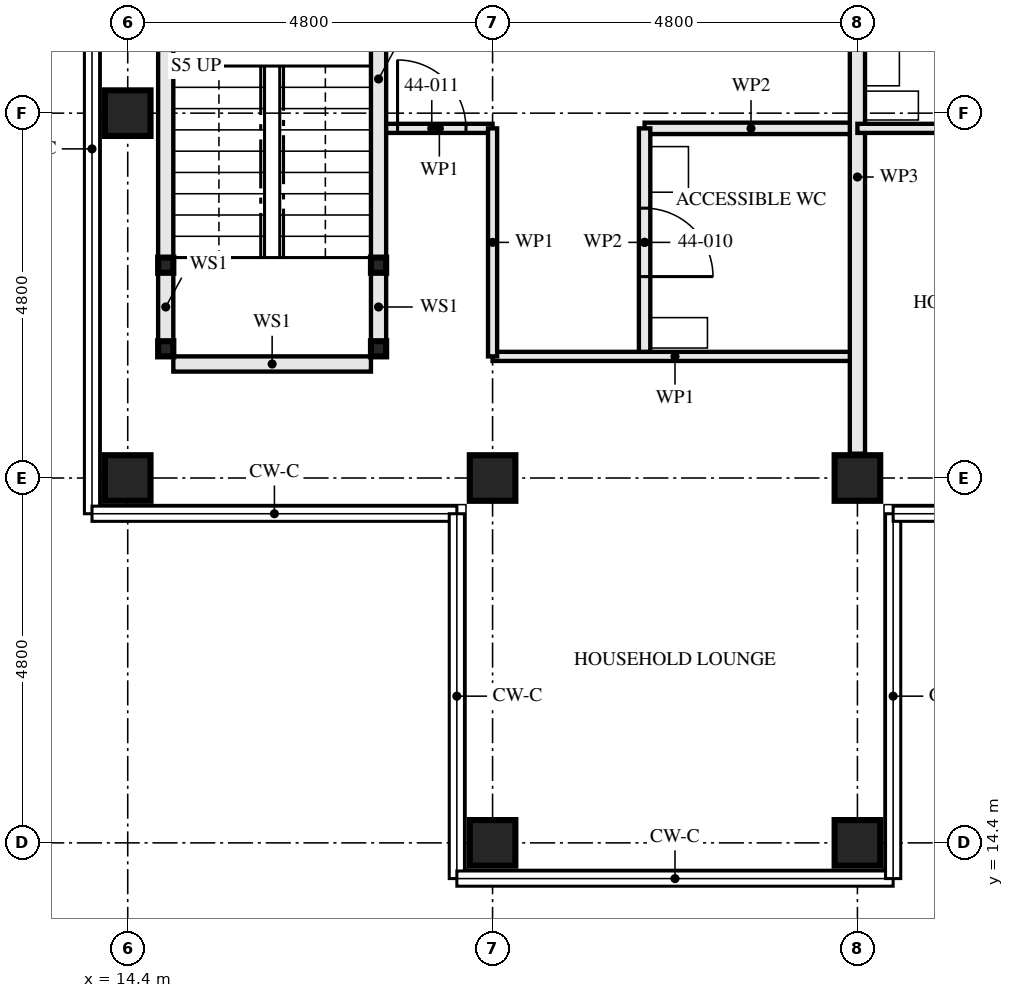
"""IFC4 building model, lengths in metres.
Left out: names, types, materials, properties, quantities, classifications, styles, units other than length and angle.
Written with IfcOpenShell. Run it as: python <this file> out.ifc"""

import sys

from ifc_helpers import new_model, si_unit, direction, frame, frame_2d, origin, origin_2d, place, context, subcontext, project, spatial, rectangle, hollow_rectangle, extrude, element, fill, save


model = new_model("IFC4")
c1 = context("Model", 3, precision=1e-05, world=origin(), true_north=direction((0.0, 1.0)))
c2 = subcontext(c1, "Body", "Model", "MODEL_VIEW")
j1 = project(units=[si_unit("LENGTHUNIT", "METRE"), si_unit("PLANEANGLEUNIT", "RADIAN")], contexts=[c1])
p1 = place(None, origin())
s1 = spatial("IfcSite", under=j1, at=p1, CompositionType="ELEMENT")
p2 = place(p1, origin())
s2 = spatial("IfcBuilding", under=s1, at=p2, CompositionType="ELEMENT")
p3 = place(p2, frame((0.0, 0.0, 162.0)))
s3 = spatial("IfcBuildingStorey", under=s2, at=p3, CompositionType="ELEMENT", Elevation=162.0)
p4 = place(p3, frame((14.4, 19.2, 0.0), z_axis=(0.0, 0.0, 1.0), x_axis=(0.0, 1.0, 0.0)))
e1 = element("IfcColumn", 1, at=p4, inside=s3, PredefinedType="COLUMN", context=c2, shape_type="SweptSolid", body=[
    extrude(hollow_rectangle(XDim=0.6, YDim=0.6, WallThickness=0.06, at=origin_2d()), origin(), (0.0, 0.0, 1.0), 3.5),
])
p5 = place(p3, frame((14.4, 24.0, 0.0), z_axis=(0.0, 0.0, 1.0), x_axis=(1.0, 0.0, 0.0)))
e2 = element("IfcColumn", 2, at=p5, inside=s3, PredefinedType="COLUMN", context=c2, shape_type="SweptSolid", body=[
    extrude(hollow_rectangle(XDim=0.6, YDim=0.6, WallThickness=0.08, at=origin_2d()), origin(), (0.0, 0.0, 1.0), 3.5),
])
for number, where, z_axis, x_axis in (
    (3, (19.2, 14.4, 0.0), (0.0, 0.0, 1.0), (0.0, 1.0, 0.0)),
    (4, (19.2, 19.2, 0.0), (0.0, 0.0, 1.0), (0.0, 1.0, 0.0)),
    (5, (24.0, 14.4, 0.0), (0.0, 0.0, 1.0), (0.0, 1.0, 0.0)),
    (6, (24.0, 19.2, 0.0), (0.0, 0.0, 1.0), (0.0, 1.0, 0.0)),
):
    element("IfcColumn", number, at=place(p3, frame(where, z_axis=z_axis, x_axis=x_axis)), inside=s3, PredefinedType="COLUMN", context=c2, shape_type="SweptSolid", body=[
        extrude(hollow_rectangle(XDim=0.6, YDim=0.6, WallThickness=0.06, at=origin_2d()), origin(), (0.0, 0.0, 1.0), 3.5),
    ])
for number, where, z_axis, x_axis in (
    (7, (14.9, 20.9, 0.0), (0.0, 0.0, 1.0), (1.0, 0.0, 0.0)),
    (8, (17.7, 20.9, 0.0), (0.0, 0.0, 1.0), (1.0, 0.0, 0.0)),
    (9, (14.9, 22.0, 0.0), (0.0, 0.0, 1.0), (1.0, 0.0, 0.0)),
    (10, (17.7, 22.0, 0.0), (0.0, 0.0, 1.0), (1.0, 0.0, 0.0)),
):
    element("IfcColumn", number, at=place(p3, frame(where, z_axis=z_axis, x_axis=x_axis)), inside=s3, PredefinedType="COLUMN", context=c2, shape_type="SweptSolid", body=[
        extrude(hollow_rectangle(XDim=0.2, YDim=0.2, WallThickness=0.008, at=origin_2d()), origin(), (0.0, 0.0, 1.0), 3.33),
    ])
p6 = place(p3, frame((14.9, 21.0, 0.0), z_axis=(0.0, 0.0, 1.0), x_axis=(0.0, 1.0, 0.0)))
e11 = element("IfcWall", 11, at=p6, inside=s3, PredefinedType="SOLIDWALL", context=c2, shape_type="SweptSolid", body=[
    extrude(rectangle(XDim=0.9, YDim=0.2, at=frame_2d((0.45, 0.0))), origin(), (0.0, 0.0, 1.0), 2.99),
])
p7 = place(p3, frame((14.9, 22.1, 0.0), z_axis=(0.0, 0.0, 1.0), x_axis=(0.0, 1.0, 0.0)))
e12 = element("IfcWall", 12, at=p7, inside=s3, PredefinedType="SOLIDWALL", context=c2, shape_type="SweptSolid", body=[
    extrude(rectangle(XDim=4.7, YDim=0.2, at=frame_2d((2.35, 0.0))), origin(), (0.0, 0.0, 1.0), 2.99),
])
p8 = place(p3, frame((17.7, 21.0, 0.0), z_axis=(0.0, 0.0, 1.0), x_axis=(0.0, 1.0, 0.0)))
e13 = element("IfcWall", 13, at=p8, inside=s3, PredefinedType="SOLIDWALL", context=c2, shape_type="SweptSolid", body=[
    extrude(rectangle(XDim=0.9, YDim=0.2, at=frame_2d((0.45, 0.0))), origin(), (0.0, 0.0, 1.0), 2.99),
])
p9 = place(p3, frame((17.7, 22.1, 0.0), z_axis=(0.0, 0.0, 1.0), x_axis=(0.0, 1.0, 0.0)))
e14 = element("IfcWall", 14, at=p9, inside=s3, PredefinedType="SOLIDWALL", context=c2, shape_type="SweptSolid", body=[
    extrude(rectangle(XDim=4.7, YDim=0.2, at=frame_2d((2.35, 0.0))), origin(), (0.0, 0.0, 1.0), 2.99),
])
p10 = place(p3, frame((15.0, 20.7, 0.0), z_axis=(0.0, 0.0, 1.0), x_axis=(1.0, 0.0, 0.0)))
e15 = element("IfcWall", 15, at=p10, inside=s3, PredefinedType="SOLIDWALL", context=c2, shape_type="SweptSolid", body=[
    extrude(rectangle(XDim=2.6, YDim=0.2, at=frame_2d((1.3, 0.0))), origin(), (0.0, 0.0, 1.0), 3.33),
])
p11 = place(p3, frame((21.2, 20.8, 0.0), z_axis=(0.0, 0.0, 1.0), x_axis=(0.0, 1.0, 0.0)))
e16 = element("IfcWall", 16, at=p11, inside=s3, PredefinedType="PARTITIONING", context=c2, shape_type="SweptSolid", body=[
    extrude(rectangle(XDim=3.0, YDim=0.15, at=frame_2d((1.5, 0.0))), origin(), (0.0, 0.0, 1.0), 3.33),
])
p12 = place(p11, frame((1.05, 0.0, 0.0)))
e17 = element("IfcOpeningElement", 17, at=p12, cuts=e16, PredefinedType="OPENING", context=c2, shape_type="SweptSolid", body=[
    extrude(rectangle(XDim=0.9, YDim=2.1, at=frame_2d((0.45, 1.05))), frame((0.0, 0.085, 0.0), z_axis=(0.0, -1.0, 0.0), x_axis=(1.0, 0.0, 0.0)), (0.0, 0.0, 1.0), 0.171),
])
p13 = place(p3, frame((21.2, 23.8, 0.0), z_axis=(0.0, 0.0, 1.0), x_axis=(1.0, 0.0, 0.0)))
e18 = element("IfcWall", 18, at=p13, inside=s3, PredefinedType="PARTITIONING", context=c2, shape_type="SweptSolid", body=[
    extrude(rectangle(XDim=2.8, YDim=0.15, at=frame_2d((1.4, 0.0))), origin(), (0.0, 0.0, 1.0), 3.33),
])
p14 = place(p3, frame((17.8, 23.8, 0.0), z_axis=(0.0, 0.0, 1.0), x_axis=(1.0, 0.0, 0.0)))
e19 = element("IfcWall", 19, at=p14, inside=s3, PredefinedType="PARTITIONING", context=c2, shape_type="SweptSolid", body=[
    extrude(rectangle(XDim=1.4, YDim=0.12, at=frame_2d((0.7, 0.0))), origin(), (0.0, 0.0, 1.0), 3.33),
])
p15 = place(p14, frame((0.15, 0.0, 0.0)))
e20 = element("IfcOpeningElement", 20, at=p15, cuts=e19, PredefinedType="OPENING", context=c2, shape_type="SweptSolid", body=[
    extrude(rectangle(XDim=0.9, YDim=2.1, at=frame_2d((0.45, 1.05))), frame((0.0, 0.071, 0.0), z_axis=(0.0, -1.0, 0.0), x_axis=(1.0, 0.0, 0.0)), (0.0, 0.0, 1.0), 0.141),
])
p16 = place(p3, frame((19.2, 20.8, 0.0), z_axis=(0.0, 0.0, 1.0), x_axis=(1.0, 0.0, 0.0)))
e21 = element("IfcWall", 21, at=p16, inside=s3, PredefinedType="PARTITIONING", context=c2, shape_type="SweptSolid", body=[
    extrude(rectangle(XDim=4.8, YDim=0.12, at=frame_2d((2.4, 0.0))), origin(), (0.0, 0.0, 1.0), 3.33),
])
p17 = place(p3, frame((19.2, 20.8, 0.0), z_axis=(0.0, 0.0, 1.0), x_axis=(0.0, 1.0, 0.0)))
e22 = element("IfcWall", 22, at=p17, inside=s3, PredefinedType="PARTITIONING", context=c2, shape_type="SweptSolid", body=[
    extrude(rectangle(XDim=3.0, YDim=0.12, at=frame_2d((1.5, 0.0))), origin(), (0.0, 0.0, 1.0), 2.55),
])
p18 = place(p3, frame((24.0, 19.52, 0.0), z_axis=(0.0, 0.0, 1.0), x_axis=(0.0, 1.0, 0.0)))
e23 = element("IfcWall", 23, at=p18, inside=s3, PredefinedType="PARTITIONING", context=c2, shape_type="SweptSolid", body=[
    extrude(rectangle(XDim=7.28, YDim=0.2, at=frame_2d((3.64, 0.0))), origin(), (0.0, 0.0, 1.0), 2.55),
])
p19 = place(p3, frame((24.0, 23.8, 0.0), z_axis=(0.0, 0.0, 1.0), x_axis=(1.0, 0.0, 0.0)))
e24 = element("IfcWall", 24, at=p19, inside=s3, PredefinedType="PARTITIONING", context=c2, shape_type="SweptSolid", body=[
    extrude(rectangle(XDim=4.48, YDim=0.12, at=frame_2d((2.24, 0.0))), origin(), (0.0, 0.0, 1.0), 3.33),
])
p20 = place(p19, frame((2.975, 0.0, 0.0)))
e25 = element("IfcOpeningElement", 25, at=p20, cuts=e24, PredefinedType="OPENING", context=c2, shape_type="SweptSolid", body=[
    extrude(rectangle(XDim=0.9, YDim=2.1, at=frame_2d((0.45, 1.05))), frame((0.0, 0.071, 0.0), z_axis=(0.0, -1.0, 0.0), x_axis=(1.0, 0.0, 0.0)), (0.0, 0.0, 1.0), 0.141),
])
p21 = place(p12, frame((0.9, 0.0, 0.0), z_axis=(0.0, 0.0, 1.0), x_axis=(-1.0, 0.0, 0.0)))
e26 = element("IfcDoor", 26, at=p21, inside=s3, OperationType="SINGLE_SWING_LEFT", PredefinedType="DOOR", context=c2, shape_type="SweptSolid", body=[
    extrude(rectangle(XDim=0.9, YDim=2.1, at=frame_2d((0.45, 1.05))), frame((0.0, 0.022, 0.0), z_axis=(0.0, -1.0, 0.0), x_axis=(1.0, 0.0, 0.0)), (0.0, 0.0, 1.0), 0.044),
])
fill(e17, e26)
p22 = place(p15, origin())
e27 = element("IfcDoor", 27, at=p22, inside=s3, OperationType="SINGLE_SWING_RIGHT", PredefinedType="DOOR", context=c2, shape_type="SweptSolid", body=[
    extrude(rectangle(XDim=0.9, YDim=2.1, at=frame_2d((0.45, 1.05))), frame((0.0, 0.022, 0.0), z_axis=(0.0, -1.0, 0.0), x_axis=(1.0, 0.0, 0.0)), (0.0, 0.0, 1.0), 0.044),
])
fill(e20, e27)
save(model, sys.argv[1])
